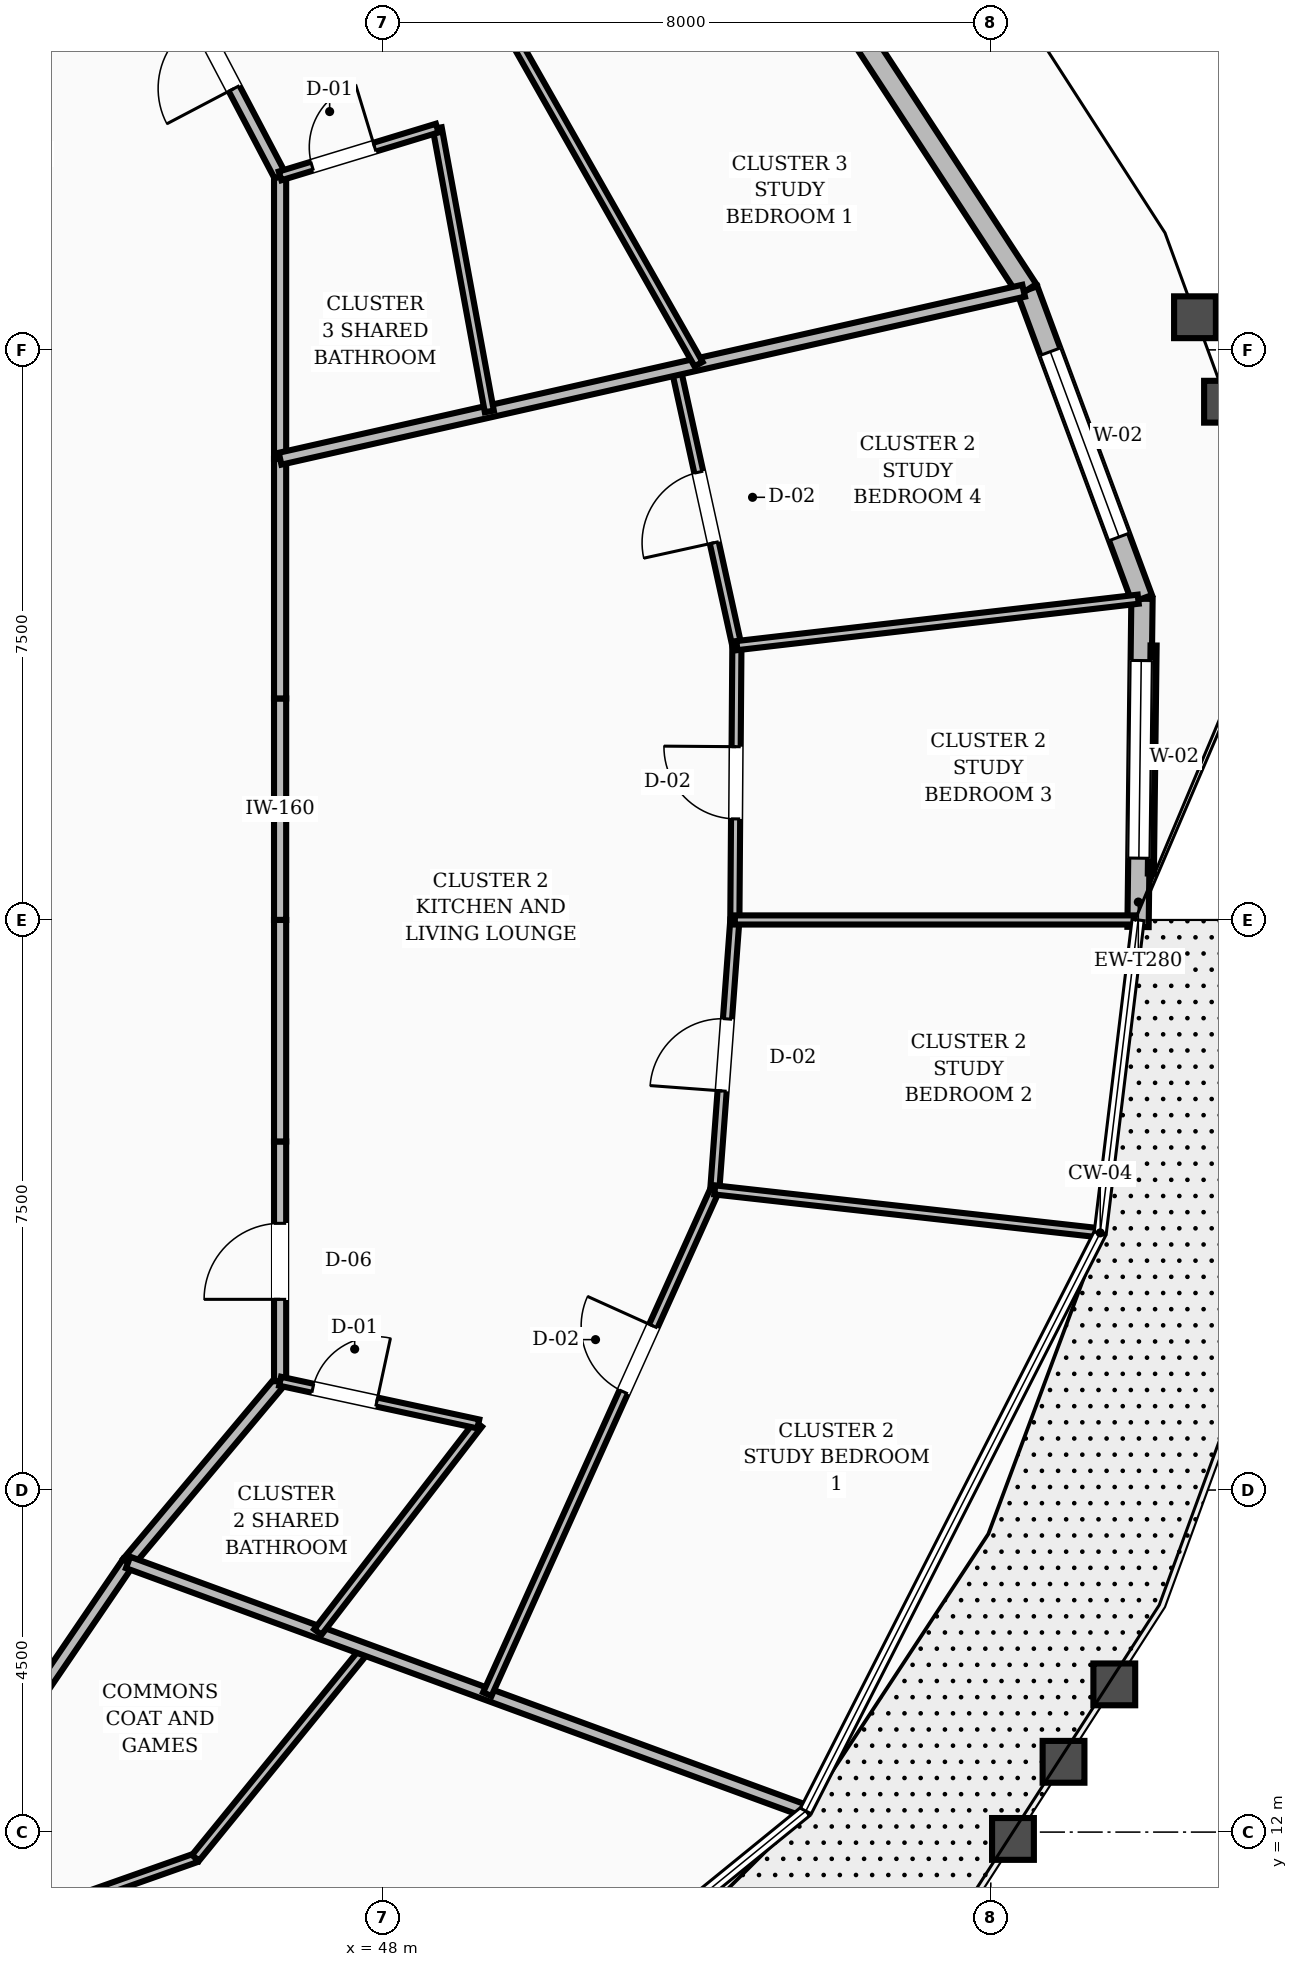
"""IFC4 building model, lengths in metres.
Left out: names, types, materials, properties, quantities, classifications, styles, units other than length and angle.
Written with IfcOpenShell. Run it as: python <this file> out.ifc"""

import sys

from ifc_helpers import new_model, si_unit, direction, frame, frame_2d, origin, place, context, subcontext, project, spatial, rectangle, extrude, element, fill, save


model = new_model("IFC4")
c1 = context("Model", 3, precision=1e-05, world=origin(), true_north=direction((0.0, 1.0)))
c2 = subcontext(c1, "Body", "Model", "MODEL_VIEW")
j1 = project(units=[si_unit("LENGTHUNIT", "METRE"), si_unit("PLANEANGLEUNIT", "RADIAN")], contexts=[c1])
p1 = place(None, origin())
s1 = spatial("IfcSite", under=j1, at=p1, CompositionType="ELEMENT")
p2 = place(p1, origin())
s2 = spatial("IfcBuilding", under=s1, at=p2, CompositionType="ELEMENT")
p3 = place(p2, frame((0.0, 0.0, 138.8)))
s3 = spatial("IfcBuildingStorey", under=s2, at=p3, CompositionType="ELEMENT", Elevation=138.8)
p4 = place(p3, frame((57.937, 23.908, 0.0), z_axis=(0.0, 0.0, 1.0), x_axis=(0.011986021203, 0.999928165068, 0.0)))
e1 = element("IfcWall", 1, at=p4, inside=s3, PredefinedType="STANDARD", context=c2, shape_type="SweptSolid", body=[
    extrude(rectangle(XDim=4.318, YDim=0.28, at=frame_2d((2.159, 0.0))), origin(), (0.0, 0.0, 1.0), 2.82),
])
p5 = place(p4, frame((0.905, 0.0, 0.8)))
e2 = element("IfcOpeningElement", 2, at=p5, cuts=e1, PredefinedType="OPENING", context=c2, shape_type="SweptSolid", body=[
    extrude(rectangle(XDim=2.6, YDim=1.65, at=frame_2d((1.3, 0.825))), frame((0.0, 0.15, 0.0), z_axis=(0.0, -1.0, 0.0), x_axis=(1.0, 0.0, 0.0)), (0.0, 0.0, 1.0), 0.3),
])
p6 = place(p3, frame((57.989, 28.226, 0.0), z_axis=(0.0, 0.0, 1.0), x_axis=(-0.347886684165, 0.937536588609, 0.0)))
e3 = element("IfcWall", 3, at=p6, inside=s3, PredefinedType="STANDARD", context=c2, shape_type="SweptSolid", body=[
    extrude(rectangle(XDim=4.334, YDim=0.28, at=frame_2d((2.167, 0.0))), origin(), (0.0, 0.0, 1.0), 2.82),
])
p7 = place(p6, frame((0.867, 0.0, 0.8)))
e4 = element("IfcOpeningElement", 4, at=p7, cuts=e3, PredefinedType="OPENING", context=c2, shape_type="SweptSolid", body=[
    extrude(rectangle(XDim=2.6, YDim=1.65, at=frame_2d((1.3, 0.825))), frame((0.0, 0.15, 0.0), z_axis=(0.0, -1.0, 0.0), x_axis=(1.0, 0.0, 0.0)), (0.0, 0.0, 1.0), 0.3),
])
p8 = place(p3, frame((56.481, 32.289, 0.0), z_axis=(0.0, 0.0, 1.0), x_axis=(-0.54727435463, 0.836953272749, 0.0)))
e5 = element("IfcWall", 5, at=p8, inside=s3, PredefinedType="STANDARD", context=c2, shape_type="SweptSolid", body=[
    extrude(rectangle(XDim=4.474, YDim=0.28, at=frame_2d((2.237, 0.0))), origin(), (0.0, 0.0, 1.0), 2.82),
])
p9 = place(p3, frame((46.65, 24.0, 0.0), z_axis=(0.0, 0.0, 1.0), x_axis=(0.0, 1.0, 0.0)))
e6 = element("IfcWall", 6, at=p9, inside=s3, PredefinedType="SOLIDWALL", context=c2, shape_type="SweptSolid", body=[
    extrude(rectangle(XDim=2.914, YDim=0.16, at=frame_2d((1.457, 0.0))), origin(), (0.0, 0.0, 1.0), 2.8),
])
p10 = place(p3, frame((46.65, 26.914, 0.0), z_axis=(0.0, 0.0, 1.0), x_axis=(0.0, 1.0, 0.0)))
e7 = element("IfcWall", 7, at=p10, inside=s3, PredefinedType="SOLIDWALL", context=c2, shape_type="SweptSolid", body=[
    extrude(rectangle(XDim=3.154, YDim=0.16, at=frame_2d((1.577, 0.0))), origin(), (0.0, 0.0, 1.0), 2.8),
])
p11 = place(p3, frame((46.65, 30.068, 0.0), z_axis=(0.0, 0.0, 1.0), x_axis=(0.0, 1.0, 0.0)))
e8 = element("IfcWall", 8, at=p11, inside=s3, PredefinedType="SOLIDWALL", context=c2, shape_type="SweptSolid", body=[
    extrude(rectangle(XDim=3.721, YDim=0.16, at=frame_2d((1.86, 0.0))), origin(), (0.0, 0.0, 1.0), 2.8),
])
p12 = place(p3, frame((46.65, 33.789, 0.0), z_axis=(0.0, 0.0, 1.0), x_axis=(-0.46527115782, 0.885168204185, 0.0)))
e9 = element("IfcWall", 9, at=p12, inside=s3, PredefinedType="SOLIDWALL", context=c2, shape_type="SweptSolid", body=[
    extrude(rectangle(XDim=3.6, YDim=0.16, at=frame_2d((1.8, 0.0))), origin(), (0.0, 0.0, 1.0), 2.8),
])
p13 = place(p12, frame((1.3, 0.0, 0.0)))
e10 = element("IfcOpeningElement", 10, at=p13, cuts=e9, PredefinedType="OPENING", context=c2, shape_type="SweptSolid", body=[
    extrude(rectangle(XDim=1.0, YDim=2.1, at=frame_2d((0.5, 1.05))), frame((0.0, 0.09, 0.0), z_axis=(0.0, -1.0, 0.0), x_axis=(1.0, 0.0, 0.0)), (0.0, 0.0, 1.0), 0.18),
])
p14 = place(p3, frame((42.95, 13.05, 0.0), z_axis=(0.0, 0.0, 1.0), x_axis=(0.562674669208, 0.826678423955, 0.0)))
e11 = element("IfcWall", 11, at=p14, inside=s3, PredefinedType="SOLIDWALL", context=c2, shape_type="SweptSolid", body=[
    extrude(rectangle(XDim=3.021, YDim=0.16, at=frame_2d((1.511, 0.0))), origin(), (0.0, 0.0, 1.0), 2.8),
])
p15 = place(p3, frame((44.65, 15.548, 0.0), z_axis=(0.0, 0.0, 1.0), x_axis=(0.642665742791, 0.76614668507, 0.0)))
e12 = element("IfcWall", 12, at=p15, inside=s3, PredefinedType="SOLIDWALL", context=c2, shape_type="SweptSolid", body=[
    extrude(rectangle(XDim=3.112, YDim=0.16, at=frame_2d((1.556, 0.0))), origin(), (0.0, 0.0, 1.0), 2.8),
])
p16 = place(p3, frame((46.65, 17.932, 0.0), z_axis=(0.0, 0.0, 1.0), x_axis=(0.0, 1.0, 0.0)))
e13 = element("IfcWall", 13, at=p16, inside=s3, PredefinedType="SOLIDWALL", context=c2, shape_type="SweptSolid", body=[
    extrude(rectangle(XDim=3.154, YDim=0.16, at=frame_2d((1.577, 0.0))), origin(), (0.0, 0.0, 1.0), 2.8),
])
p17 = place(p16, frame((1.077, 0.0, 0.0)))
e14 = element("IfcOpeningElement", 14, at=p17, cuts=e13, PredefinedType="OPENING", context=c2, shape_type="SweptSolid", body=[
    extrude(rectangle(XDim=1.0, YDim=2.1, at=frame_2d((0.5, 1.05))), frame((0.0, 0.09, 0.0), z_axis=(0.0, -1.0, 0.0), x_axis=(1.0, 0.0, 0.0)), (0.0, 0.0, 1.0), 0.18),
])
p18 = place(p3, frame((46.65, 21.086, 0.0), z_axis=(0.0, 0.0, 1.0), x_axis=(0.0, 1.0, 0.0)))
e15 = element("IfcWall", 15, at=p18, inside=s3, PredefinedType="SOLIDWALL", context=c2, shape_type="SweptSolid", body=[
    extrude(rectangle(XDim=2.914, YDim=0.16, at=frame_2d((1.457, 0.0))), origin(), (0.0, 0.0, 1.0), 2.8),
])
p19 = place(p3, frame((42.017, 10.417, 0.0), z_axis=(0.0, 0.0, 1.0), x_axis=(0.942909418958, 0.333049287104, 0.0)))
e16 = element("IfcWall", 16, at=p19, inside=s3, PredefinedType="PARTITIONING", context=c2, shape_type="SweptSolid", body=[
    extrude(rectangle(XDim=3.733, YDim=0.12, at=frame_2d((1.867, 0.0))), origin(), (0.0, 0.0, 1.0), 2.8),
])
p20 = place(p3, frame((45.537, 11.66, 0.0), z_axis=(0.0, 0.0, 1.0), x_axis=(0.631597669675, 0.775296319906, 0.0)))
e17 = element("IfcWall", 17, at=p20, inside=s3, PredefinedType="PARTITIONING", context=c2, shape_type="SweptSolid", body=[
    extrude(rectangle(XDim=3.537, YDim=0.12, at=frame_2d((1.769, 0.0))), origin(), (0.0, 0.0, 1.0), 2.8),
])
p21 = place(p3, frame((44.65, 15.548, 0.0), z_axis=(0.0, 0.0, 1.0), x_axis=(0.938840675632, -0.344351834291, 0.0)))
e18 = element("IfcWall", 18, at=p21, inside=s3, PredefinedType="SOLIDWALL", context=c2, shape_type="SweptSolid", body=[
    extrude(rectangle(XDim=9.448, YDim=0.16, at=frame_2d((4.724, 0.0))), origin(), (0.0, 0.0, 1.0), 2.8),
])
p22 = place(p3, frame((47.147, 14.632, 0.0), z_axis=(0.0, 0.0, 1.0), x_axis=(0.610601059946, 0.791938347091, 0.0)))
e19 = element("IfcWall", 19, at=p22, inside=s3, PredefinedType="PARTITIONING", context=c2, shape_type="SweptSolid", body=[
    extrude(rectangle(XDim=3.457, YDim=0.12, at=frame_2d((1.729, 0.0))), origin(), (0.0, 0.0, 1.0), 2.8),
])
p23 = place(p3, frame((46.65, 17.932, 0.0), z_axis=(0.0, 0.0, 1.0), x_axis=(0.977558011397, -0.210666405377, 0.0)))
e20 = element("IfcWall", 20, at=p23, inside=s3, PredefinedType="PARTITIONING", context=c2, shape_type="SweptSolid", body=[
    extrude(rectangle(XDim=2.668, YDim=0.12, at=frame_2d((1.334, 0.0))), origin(), (0.0, 0.0, 1.0), 2.8),
])
p24 = place(p23, frame((0.44, 0.0, 0.0)))
e21 = element("IfcOpeningElement", 21, at=p24, cuts=e20, PredefinedType="OPENING", context=c2, shape_type="SweptSolid", body=[
    extrude(rectangle(XDim=0.86, YDim=2.1, at=frame_2d((0.43, 1.05))), frame((0.0, 0.07, 0.0), z_axis=(0.0, -1.0, 0.0), x_axis=(1.0, 0.0, 0.0)), (0.0, 0.0, 1.0), 0.14),
])
p25 = place(p3, frame((49.376, 13.814, 0.0), z_axis=(0.0, 0.0, 1.0), x_axis=(0.411193017438, 0.911548299549, 0.0)))
e22 = element("IfcWall", 22, at=p25, inside=s3, PredefinedType="PARTITIONING", context=c2, shape_type="SweptSolid", body=[
    extrude(rectangle(XDim=7.278, YDim=0.12, at=frame_2d((3.639, 0.0))), origin(), (0.0, 0.0, 1.0), 2.8),
])
p26 = place(p25, frame((4.363, 0.0, 0.0)))
e23 = element("IfcOpeningElement", 23, at=p26, cuts=e22, PredefinedType="OPENING", context=c2, shape_type="SweptSolid", body=[
    extrude(rectangle(XDim=0.95, YDim=2.1, at=frame_2d((0.475, 1.05))), frame((0.0, 0.07, 0.0), z_axis=(0.0, -1.0, 0.0), x_axis=(1.0, 0.0, 0.0)), (0.0, 0.0, 1.0), 0.14),
])
p27 = place(p3, frame((52.369, 20.448, 0.0), z_axis=(0.0, 0.0, 1.0), x_axis=(0.074174700908, 0.997245262583, 0.0)))
e24 = element("IfcWall", 24, at=p27, inside=s3, PredefinedType="PARTITIONING", context=c2, shape_type="SweptSolid", body=[
    extrude(rectangle(XDim=3.561, YDim=0.12, at=frame_2d((1.781, 0.0))), origin(), (0.0, 0.0, 1.0), 2.8),
])
p28 = place(p27, frame((1.306, 0.0, 0.0)))
e25 = element("IfcOpeningElement", 25, at=p28, cuts=e24, PredefinedType="OPENING", context=c2, shape_type="SweptSolid", body=[
    extrude(rectangle(XDim=0.95, YDim=2.1, at=frame_2d((0.475, 1.05))), frame((0.0, 0.07, 0.0), z_axis=(0.0, -1.0, 0.0), x_axis=(1.0, 0.0, 0.0)), (0.0, 0.0, 1.0), 0.14),
])
p29 = place(p3, frame((52.369, 20.448, 0.0), z_axis=(0.0, 0.0, 1.0), x_axis=(0.993848327546, -0.110749726115, 0.0)))
e26 = element("IfcWall", 26, at=p29, inside=s3, PredefinedType="PARTITIONING", context=c2, shape_type="SweptSolid", body=[
    extrude(rectangle(XDim=5.052, YDim=0.12, at=frame_2d((2.526, 0.0))), origin(), (0.0, 0.0, 1.0), 2.8),
])
p30 = place(p3, frame((52.633, 24.0, 0.0), z_axis=(0.0, 0.0, 1.0), x_axis=(0.007440270244, 0.999972320806, 0.0)))
e27 = element("IfcWall", 27, at=p30, inside=s3, PredefinedType="PARTITIONING", context=c2, shape_type="SweptSolid", body=[
    extrude(rectangle(XDim=3.609, YDim=0.12, at=frame_2d((1.805, 0.0))), origin(), (0.0, 0.0, 1.0), 2.8),
])
p31 = place(p30, frame((1.33, 0.0, 0.0)))
e28 = element("IfcOpeningElement", 28, at=p31, cuts=e27, PredefinedType="OPENING", context=c2, shape_type="SweptSolid", body=[
    extrude(rectangle(XDim=0.95, YDim=2.1, at=frame_2d((0.475, 1.05))), frame((0.0, 0.07, 0.0), z_axis=(0.0, -1.0, 0.0), x_axis=(1.0, 0.0, 0.0)), (0.0, 0.0, 1.0), 0.14),
])
p32 = place(p3, frame((52.633, 24.0, 0.0), z_axis=(0.0, 0.0, 1.0), x_axis=(1.0, 0.0, 0.0)))
e29 = element("IfcWall", 29, at=p32, inside=s3, PredefinedType="PARTITIONING", context=c2, shape_type="SweptSolid", body=[
    extrude(rectangle(XDim=5.255, YDim=0.12, at=frame_2d((2.628, 0.0))), origin(), (0.0, 0.0, 1.0), 2.8),
])
p33 = place(p3, frame((52.66, 27.609, 0.0), z_axis=(0.0, 0.0, 1.0), x_axis=(-0.214645343864, 0.976692058101, 0.0)))
e30 = element("IfcWall", 30, at=p33, inside=s3, PredefinedType="PARTITIONING", context=c2, shape_type="SweptSolid", body=[
    extrude(rectangle(XDim=3.723, YDim=0.12, at=frame_2d((1.861, 0.0))), origin(), (0.0, 0.0, 1.0), 2.8),
])
p34 = place(p33, frame((1.386, 0.0, 0.0)))
e31 = element("IfcOpeningElement", 31, at=p34, cuts=e30, PredefinedType="OPENING", context=c2, shape_type="SweptSolid", body=[
    extrude(rectangle(XDim=0.95, YDim=2.1, at=frame_2d((0.475, 1.05))), frame((0.0, 0.07, 0.0), z_axis=(0.0, -1.0, 0.0), x_axis=(1.0, 0.0, 0.0)), (0.0, 0.0, 1.0), 0.14),
])
p35 = place(p3, frame((52.66, 27.609, 0.0), z_axis=(0.0, 0.0, 1.0), x_axis=(0.993373885647, 0.1149274698, 0.0)))
e32 = element("IfcWall", 32, at=p35, inside=s3, PredefinedType="PARTITIONING", context=c2, shape_type="SweptSolid", body=[
    extrude(rectangle(XDim=5.315, YDim=0.12, at=frame_2d((2.657, 0.0))), origin(), (0.0, 0.0, 1.0), 2.8),
])
p36 = place(p3, frame((46.65, 30.068, 0.0), z_axis=(0.0, 0.0, 1.0), x_axis=(0.975414000127, 0.220380417359, 0.0)))
e33 = element("IfcWall", 33, at=p36, inside=s3, PredefinedType="SOLIDWALL", context=c2, shape_type="SweptSolid", body=[
    extrude(rectangle(XDim=10.029, YDim=0.16, at=frame_2d((5.015, 0.0))), origin(), (0.0, 0.0, 1.0), 2.8),
])
p37 = place(p3, frame((49.403, 30.69, 0.0), z_axis=(0.0, 0.0, 1.0), x_axis=(-0.180891883728, 0.98350298749, 0.0)))
e34 = element("IfcWall", 34, at=p37, inside=s3, PredefinedType="PARTITIONING", context=c2, shape_type="SweptSolid", body=[
    extrude(rectangle(XDim=3.79, YDim=0.12, at=frame_2d((1.895, 0.0))), origin(), (0.0, 0.0, 1.0), 2.8),
])
p38 = place(p3, frame((46.65, 33.789, 0.0), z_axis=(0.0, 0.0, 1.0), x_axis=(0.956734072181, 0.290963769442, 0.0)))
e35 = element("IfcWall", 35, at=p38, inside=s3, PredefinedType="PARTITIONING", context=c2, shape_type="SweptSolid", body=[
    extrude(rectangle(XDim=2.161, YDim=0.12, at=frame_2d((1.08, 0.0))), origin(), (0.0, 0.0, 1.0), 2.8),
])
p39 = place(p38, frame((0.44, 0.0, 0.0)))
e36 = element("IfcOpeningElement", 36, at=p39, cuts=e35, PredefinedType="OPENING", context=c2, shape_type="SweptSolid", body=[
    extrude(rectangle(XDim=0.86, YDim=2.1, at=frame_2d((0.43, 1.05))), frame((0.0, 0.07, 0.0), z_axis=(0.0, -1.0, 0.0), x_axis=(1.0, 0.0, 0.0)), (0.0, 0.0, 1.0), 0.14),
])
p40 = place(p3, frame((52.156, 31.312, 0.0), z_axis=(0.0, 0.0, 1.0), x_axis=(-0.493164704103, 0.869935960072, 0.0)))
e37 = element("IfcWall", 37, at=p40, inside=s3, PredefinedType="PARTITIONING", context=c2, shape_type="SweptSolid", body=[
    extrude(rectangle(XDim=8.017, YDim=0.12, at=frame_2d((4.008, 0.0))), origin(), (0.0, 0.0, 1.0), 2.8),
])
p41 = place(p40, frame((4.895, 0.0, 0.0)))
e38 = element("IfcOpeningElement", 38, at=p41, cuts=e37, PredefinedType="OPENING", context=c2, shape_type="SweptSolid", body=[
    extrude(rectangle(XDim=0.95, YDim=2.1, at=frame_2d((0.475, 1.05))), frame((0.0, 0.07, 0.0), z_axis=(0.0, -1.0, 0.0), x_axis=(1.0, 0.0, 0.0)), (0.0, 0.0, 1.0), 0.14),
])
p42 = place(p5, origin())
e39 = element("IfcWindow", 39, at=p42, inside=s3, PartitioningType="SINGLE_PANEL", PredefinedType="WINDOW", context=c2, shape_type="SweptSolid", body=[
    extrude(rectangle(XDim=2.6, YDim=1.65, at=frame_2d((1.3, 0.825))), frame((0.0, 0.03, 0.0), z_axis=(0.0, -1.0, 0.0), x_axis=(1.0, 0.0, 0.0)), (0.0, 0.0, 1.0), 0.06),
])
fill(e2, e39)
p43 = place(p7, origin())
e40 = element("IfcWindow", 40, at=p43, inside=s3, PartitioningType="SINGLE_PANEL", PredefinedType="WINDOW", context=c2, shape_type="SweptSolid", body=[
    extrude(rectangle(XDim=2.6, YDim=1.65, at=frame_2d((1.3, 0.825))), frame((0.0, 0.03, 0.0), z_axis=(0.0, -1.0, 0.0), x_axis=(1.0, 0.0, 0.0)), (0.0, 0.0, 1.0), 0.06),
])
fill(e4, e40)
p44 = place(p24, origin())
e41 = element("IfcDoor", 41, at=p44, inside=s3, OperationType="SINGLE_SWING_RIGHT", PredefinedType="DOOR", context=c2, shape_type="SweptSolid", body=[
    extrude(rectangle(XDim=0.86, YDim=2.1, at=frame_2d((0.43, 1.05))), frame((0.0, 0.025, 0.0), z_axis=(0.0, -1.0, 0.0), x_axis=(1.0, 0.0, 0.0)), (0.0, 0.0, 1.0), 0.05),
])
fill(e21, e41)
p45 = place(p17, origin())
e42 = element("IfcDoor", 42, at=p45, inside=s3, OperationType="SINGLE_SWING_LEFT", PredefinedType="DOOR", context=c2, shape_type="SweptSolid", body=[
    extrude(rectangle(XDim=1.0, YDim=2.1, at=frame_2d((0.5, 1.05))), frame((0.0, 0.025, 0.0), z_axis=(0.0, -1.0, 0.0), x_axis=(1.0, 0.0, 0.0)), (0.0, 0.0, 1.0), 0.05),
])
fill(e14, e42)
p46 = place(p26, origin())
e43 = element("IfcDoor", 43, at=p46, inside=s3, OperationType="SINGLE_SWING_RIGHT", PredefinedType="DOOR", context=c2, shape_type="SweptSolid", body=[
    extrude(rectangle(XDim=0.95, YDim=2.1, at=frame_2d((0.475, 1.05))), frame((0.0, 0.025, 0.0), z_axis=(0.0, -1.0, 0.0), x_axis=(1.0, 0.0, 0.0)), (0.0, 0.0, 1.0), 0.05),
])
fill(e23, e43)
p47 = place(p28, origin())
e44 = element("IfcDoor", 44, at=p47, inside=s3, OperationType="SINGLE_SWING_LEFT", PredefinedType="DOOR", context=c2, shape_type="SweptSolid", body=[
    extrude(rectangle(XDim=0.95, YDim=2.1, at=frame_2d((0.475, 1.05))), frame((0.0, 0.025, 0.0), z_axis=(0.0, -1.0, 0.0), x_axis=(1.0, 0.0, 0.0)), (0.0, 0.0, 1.0), 0.05),
])
fill(e25, e44)
p48 = place(p31, origin())
e45 = element("IfcDoor", 45, at=p48, inside=s3, OperationType="SINGLE_SWING_RIGHT", PredefinedType="DOOR", context=c2, shape_type="SweptSolid", body=[
    extrude(rectangle(XDim=0.95, YDim=2.1, at=frame_2d((0.475, 1.05))), frame((0.0, 0.025, 0.0), z_axis=(0.0, -1.0, 0.0), x_axis=(1.0, 0.0, 0.0)), (0.0, 0.0, 1.0), 0.05),
])
fill(e28, e45)
p49 = place(p34, origin())
e46 = element("IfcDoor", 46, at=p49, inside=s3, OperationType="SINGLE_SWING_LEFT", PredefinedType="DOOR", context=c2, shape_type="SweptSolid", body=[
    extrude(rectangle(XDim=0.95, YDim=2.1, at=frame_2d((0.475, 1.05))), frame((0.0, 0.025, 0.0), z_axis=(0.0, -1.0, 0.0), x_axis=(1.0, 0.0, 0.0)), (0.0, 0.0, 1.0), 0.05),
])
fill(e31, e46)
p50 = place(p39, origin())
e47 = element("IfcDoor", 47, at=p50, inside=s3, OperationType="SINGLE_SWING_RIGHT", PredefinedType="DOOR", context=c2, shape_type="SweptSolid", body=[
    extrude(rectangle(XDim=0.86, YDim=2.1, at=frame_2d((0.43, 1.05))), frame((0.0, 0.025, 0.0), z_axis=(0.0, -1.0, 0.0), x_axis=(1.0, 0.0, 0.0)), (0.0, 0.0, 1.0), 0.05),
])
fill(e36, e47)
p51 = place(p13, origin())
e48 = element("IfcDoor", 48, at=p51, inside=s3, OperationType="SINGLE_SWING_LEFT", PredefinedType="DOOR", context=c2, shape_type="SweptSolid", body=[
    extrude(rectangle(XDim=1.0, YDim=2.1, at=frame_2d((0.5, 1.05))), frame((0.0, 0.025, 0.0), z_axis=(0.0, -1.0, 0.0), x_axis=(1.0, 0.0, 0.0)), (0.0, 0.0, 1.0), 0.05),
])
fill(e10, e48)
save(model, sys.argv[1])
